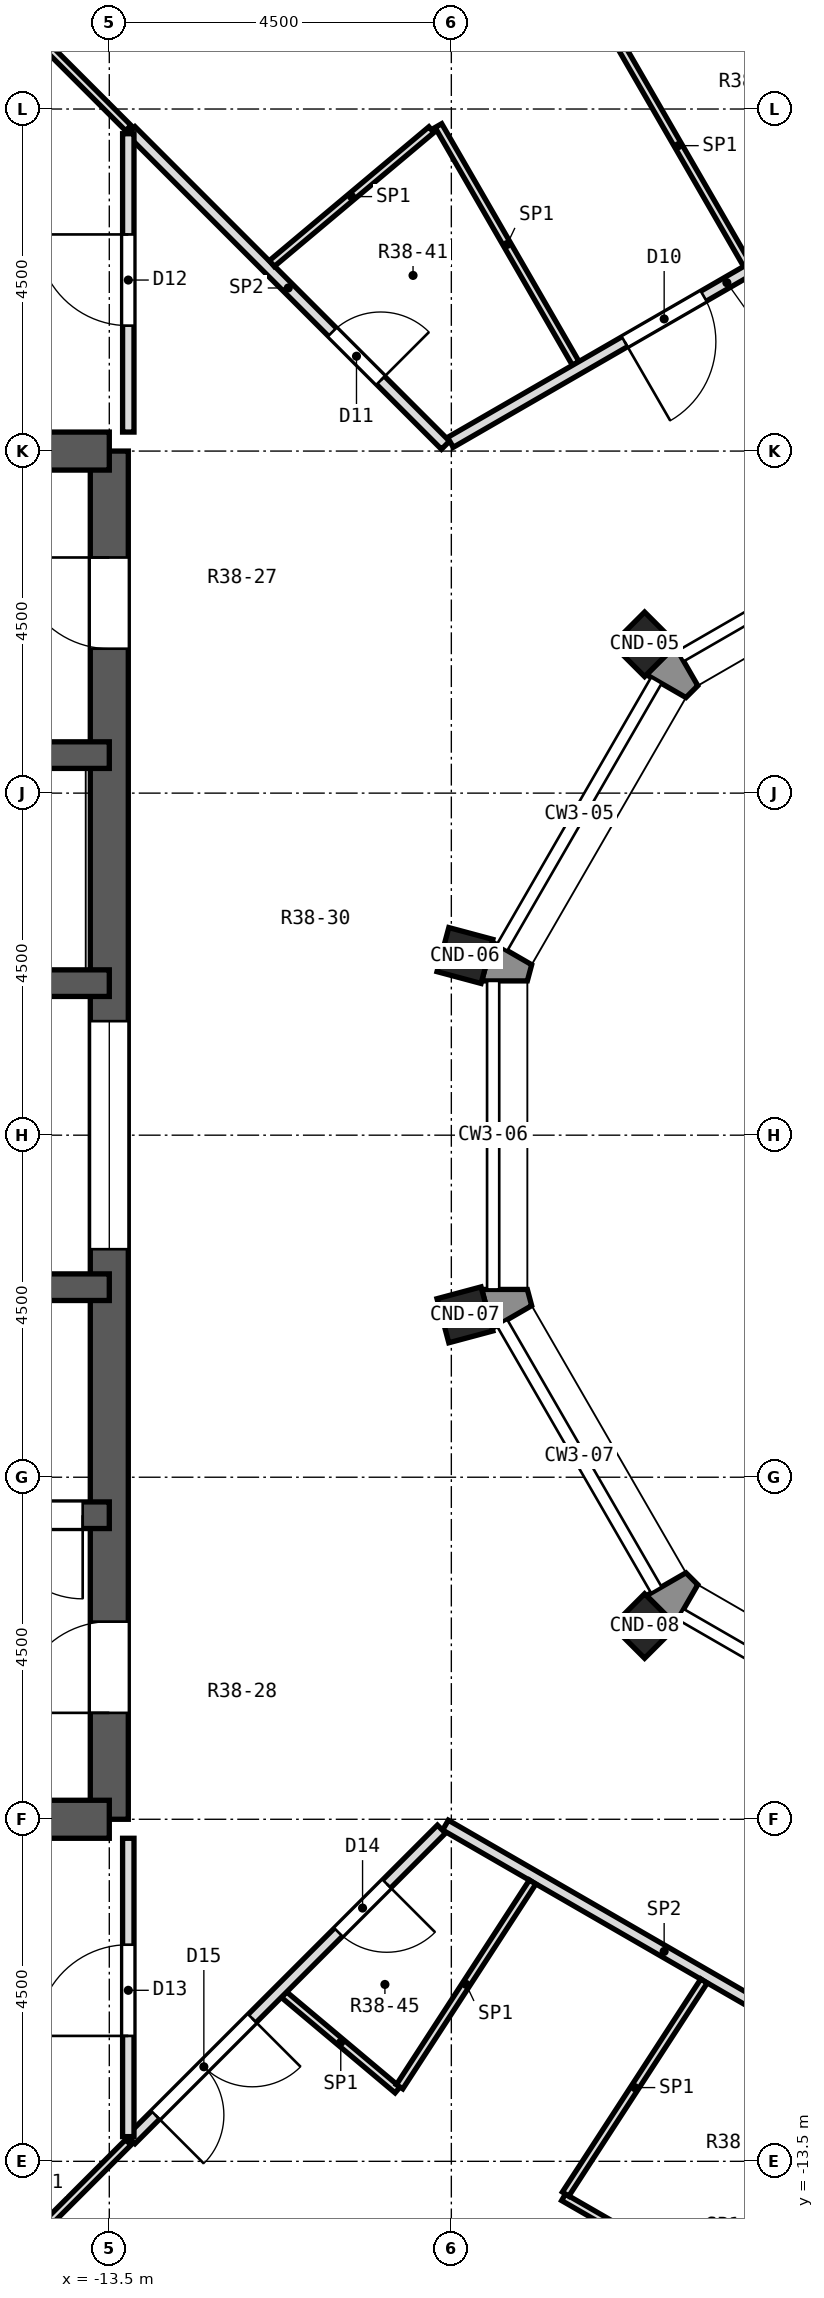
"""IFC4 building model, lengths in metres.
Left out: names, types, materials, properties, quantities, classifications, styles, units other than length and angle.
Written with IfcOpenShell. Run it as: python <this file> out.ifc"""

import sys

from ifc_helpers import new_model, si_unit, direction, frame, frame_2d, origin, origin_2d, place, context, subcontext, project, spatial, polyline, rectangle, outline, extrude, element, fill, save


model = new_model("IFC4")
c1 = context("Model", 3, precision=1e-05, world=origin(), true_north=direction((0.0, 1.0)))
c2 = subcontext(c1, "Body", "Model", "MODEL_VIEW")
j1 = project(units=[si_unit("LENGTHUNIT", "METRE"), si_unit("PLANEANGLEUNIT", "RADIAN")], contexts=[c1])
p1 = place(None, origin())
s1 = spatial("IfcSite", under=j1, at=p1, CompositionType="ELEMENT")
p2 = place(p1, origin())
s2 = spatial("IfcBuilding", under=s1, at=p2, CompositionType="ELEMENT")
p3 = place(p2, frame((0.0, 0.0, 279.2)))
s3 = spatial("IfcBuildingStorey", under=s2, at=p3, CompositionType="ELEMENT", Elevation=279.2)
for number, where, z_axis, x_axis in (
    (1, (-6.458, 6.458, 0.0), (0.0, 0.0, 1.0), (-0.707, 0.707, 0.0)),
    (2, (-8.821, 2.364, 0.0), (0.0, 0.0, 1.0), (-0.966, 0.259, 0.0)),
    (3, (-8.821, -2.364, 0.0), (0.0, 0.0, 1.0), (-0.966, -0.259, 0.0)),
    (4, (-6.458, -6.458, 0.0), (0.0, 0.0, 1.0), (-0.707, -0.707, 0.0)),
):
    element("IfcColumn", number, at=place(p3, frame(where, z_axis=z_axis, x_axis=x_axis)), inside=s3, PredefinedType="COLUMN", context=c2, shape_type="SweptSolid", body=[
        extrude(rectangle(XDim=0.6, YDim=0.6, at=origin_2d()), origin(), (0.0, 0.0, 1.0), 5.0),
    ])
p4 = place(p3, frame((-13.5, -9.0, 0.0), z_axis=(0.0, 0.0, 1.0), x_axis=(0.0, 1.0, 0.0)))
e5 = element("IfcWall", 5, at=p4, inside=s3, PredefinedType="SHEAR", context=c2, shape_type="SweptSolid", body=[
    extrude(rectangle(XDim=18.0, YDim=0.5, at=frame_2d((9.0, 0.0))), origin(), (0.0, 0.0, 1.0), 5.0),
])
p5 = place(p4, frame((15.4, 0.0, 0.0)))
e6 = element("IfcOpeningElement", 6, at=p5, cuts=e5, PredefinedType="OPENING", context=c2, shape_type="SweptSolid", body=[
    extrude(rectangle(XDim=1.2, YDim=2.1, at=frame_2d((0.6, 1.05))), frame((0.0, 0.262, 0.0), z_axis=(0.0, -1.0, 0.0), x_axis=(1.0, 0.0, 0.0)), (0.0, 0.0, 1.0), 0.524),
])
p6 = place(p4, frame((1.4, 0.0, 0.0)))
e7 = element("IfcOpeningElement", 7, at=p6, cuts=e5, PredefinedType="OPENING", context=c2, shape_type="SweptSolid", body=[
    extrude(rectangle(XDim=1.2, YDim=2.1, at=frame_2d((0.6, 1.05))), frame((0.0, 0.262, 0.0), z_axis=(0.0, -1.0, 0.0), x_axis=(1.0, 0.0, 0.0)), (0.0, 0.0, 1.0), 0.524),
])
p7 = place(p4, frame((7.5, 0.0, 0.0)))
e8 = element("IfcOpeningElement", 8, at=p7, cuts=e5, PredefinedType="OPENING", context=c2, shape_type="SweptSolid", body=[
    extrude(rectangle(XDim=3.0, YDim=2.4, at=frame_2d((1.5, 1.2))), frame((0.0, 0.262, 0.0), z_axis=(0.0, -1.0, 0.0), x_axis=(1.0, 0.0, 0.0)), (0.0, 0.0, 1.0), 0.524),
])
for number, where, z_axis, x_axis in (
    (9, (-13.5, 9.0, 0.0), (0.0, 0.0, 1.0), (-1.0, 0.0, 0.0)),
    (10, (-13.5, -9.0, 0.0), (0.0, 0.0, 1.0), (-1.0, 0.0, 0.0)),
):
    element("IfcWall", number, at=place(p3, frame(where, z_axis=z_axis, x_axis=x_axis)), inside=s3, PredefinedType="SHEAR", context=c2, shape_type="SweptSolid", body=[
        extrude(rectangle(XDim=6.0, YDim=0.5, at=frame_2d((3.0, 0.0))), origin(), (0.0, 0.0, 1.0), 5.0),
    ])
p8 = place(p3, frame((-13.5, 5.0, 0.0), z_axis=(0.0, 0.0, 1.0), x_axis=(-1.0, 0.0, 0.0)))
e11 = element("IfcWall", 11, at=p8, inside=s3, PredefinedType="SHEAR", context=c2, shape_type="SweptSolid", body=[
    extrude(rectangle(XDim=6.0, YDim=0.35, at=frame_2d((3.0, 0.0))), origin(), (0.0, 0.0, 1.0), 5.0),
])
p9 = place(p3, frame((-13.5, -5.0, 0.0), z_axis=(0.0, 0.0, 1.0), x_axis=(-1.0, 0.0, 0.0)))
e12 = element("IfcWall", 12, at=p9, inside=s3, PredefinedType="SHEAR", context=c2, shape_type="SweptSolid", body=[
    extrude(rectangle(XDim=6.0, YDim=0.35, at=frame_2d((3.0, 0.0))), origin(), (0.0, 0.0, 1.0), 5.0),
])
p10 = place(p9, frame((0.35, 0.0, 0.0)))
e13 = element("IfcOpeningElement", 13, at=p10, cuts=e12, PredefinedType="OPENING", context=c2, shape_type="SweptSolid", body=[
    extrude(rectangle(XDim=1.1, YDim=2.1, at=frame_2d((0.55, 1.05))), frame((0.0, 0.187, 0.0), z_axis=(0.0, -1.0, 0.0), x_axis=(1.0, 0.0, 0.0)), (0.0, 0.0, 1.0), 0.374),
])
p11 = place(p3, frame((-13.5, 2.0, 0.0), z_axis=(0.0, 0.0, 1.0), x_axis=(-1.0, 0.0, 0.0)))
e14 = element("IfcWall", 14, at=p11, inside=s3, PredefinedType="SHEAR", context=c2, shape_type="SweptSolid", body=[
    extrude(rectangle(XDim=6.0, YDim=0.35, at=frame_2d((3.0, 0.0))), origin(), (0.0, 0.0, 1.0), 5.0),
])
p12 = place(p11, frame((1.37, 0.0, 0.0)))
e15 = element("IfcOpeningElement", 15, at=p12, cuts=e14, PredefinedType="OPENING", context=c2, shape_type="SweptSolid", body=[
    extrude(rectangle(XDim=1.1, YDim=2.1, at=frame_2d((0.55, 1.05))), frame((0.0, 0.187, 0.0), z_axis=(0.0, -1.0, 0.0), x_axis=(1.0, 0.0, 0.0)), (0.0, 0.0, 1.0), 0.374),
])
p13 = place(p11, frame((3.09, 0.0, 0.0)))
e16 = element("IfcOpeningElement", 16, at=p13, cuts=e14, PredefinedType="OPENING", context=c2, shape_type="SweptSolid", body=[
    extrude(rectangle(XDim=1.1, YDim=2.1, at=frame_2d((0.55, 1.05))), frame((0.0, 0.187, 0.0), z_axis=(0.0, -1.0, 0.0), x_axis=(1.0, 0.0, 0.0)), (0.0, 0.0, 1.0), 0.374),
])
p14 = place(p11, frame((5.105, 0.0, 0.0)))
e17 = element("IfcOpeningElement", 17, at=p14, cuts=e14, PredefinedType="OPENING", context=c2, shape_type="SweptSolid", body=[
    extrude(rectangle(XDim=0.6, YDim=2.1, at=frame_2d((0.3, 1.05))), frame((0.0, 0.187, 0.0), z_axis=(0.0, -1.0, 0.0), x_axis=(1.0, 0.0, 0.0)), (0.0, 0.0, 1.0), 0.374),
])
p15 = place(p3, frame((-13.5, -2.0, 0.0), z_axis=(0.0, 0.0, 1.0), x_axis=(-1.0, 0.0, 0.0)))
e18 = element("IfcWall", 18, at=p15, inside=s3, PredefinedType="SHEAR", context=c2, shape_type="SweptSolid", body=[
    extrude(rectangle(XDim=6.0, YDim=0.35, at=frame_2d((3.0, 0.0))), origin(), (0.0, 0.0, 1.0), 5.0),
])
p16 = place(p15, frame((1.14, 0.0, 0.0)))
e19 = element("IfcOpeningElement", 19, at=p16, cuts=e18, PredefinedType="OPENING", context=c2, shape_type="SweptSolid", body=[
    extrude(rectangle(XDim=1.0, YDim=2.1, at=frame_2d((0.5, 1.05))), frame((0.0, 0.187, 0.0), z_axis=(0.0, -1.0, 0.0), x_axis=(1.0, 0.0, 0.0)), (0.0, 0.0, 1.0), 0.374),
])
p17 = place(p3, origin())
e20 = element("IfcWall", 20, at=p17, inside=s3, PredefinedType="SOLIDWALL", context=c2, shape_type="SweptSolid", body=[
    extrude(outline(polyline([(-6.433, 6.058), (-5.914, 5.758), (-5.758, 5.914), (-6.058, 6.433), (-6.433, 6.058)])), origin(), (0.0, 0.0, 1.0), 4.45),
])
p18 = place(p3, origin())
e21 = element("IfcWall", 21, at=p18, inside=s3, PredefinedType="SOLIDWALL", context=c2, shape_type="SweptSolid", body=[
    extrude(outline(polyline([(-8.6, 2.029), (-8.0, 2.029), (-7.943, 2.242), (-8.462, 2.542), (-8.6, 2.029)])), origin(), (0.0, 0.0, 1.0), 4.45),
])
p19 = place(p3, origin())
e22 = element("IfcWall", 22, at=p19, inside=s3, PredefinedType="SOLIDWALL", context=c2, shape_type="SweptSolid", body=[
    extrude(outline(polyline([(-8.462, -2.542), (-7.943, -2.242), (-8.0, -2.029), (-8.6, -2.029), (-8.462, -2.542)])), origin(), (0.0, 0.0, 1.0), 4.45),
])
p20 = place(p3, origin())
e23 = element("IfcWall", 23, at=p20, inside=s3, PredefinedType="SOLIDWALL", context=c2, shape_type="SweptSolid", body=[
    extrude(outline(polyline([(-6.058, -6.433), (-5.758, -5.914), (-5.914, -5.758), (-6.433, -6.058), (-6.058, -6.433)])), origin(), (0.0, 0.0, 1.0), 4.45),
])
p21 = place(p3, frame((-5.646, 21.072, 0.0), z_axis=(0.0, 0.0, 1.0), x_axis=(0.258728835498, -0.965949993365, 0.0)))
e24 = element("IfcWall", 24, at=p21, inside=s3, PredefinedType="PARTITIONING", context=c2, shape_type="SweptSolid", body=[
    extrude(rectangle(XDim=8.978, YDim=0.1, at=frame_2d((4.489, 0.0))), origin(), (0.0, 0.0, 1.0), 4.45),
])
p22 = place(p3, frame((-9.17, 13.282, 0.0), z_axis=(0.0, 0.0, 1.0), x_axis=(0.49998372882, -0.866034797751, 0.0)))
e25 = element("IfcWall", 25, at=p22, inside=s3, PredefinedType="PARTITIONING", context=c2, shape_type="SweptSolid", body=[
    extrude(rectangle(XDim=3.613, YDim=0.1, at=frame_2d((1.806, 0.0))), origin(), (0.0, 0.0, 1.0), 4.45),
])
p23 = place(p3, frame((-6.918, 14.582, 0.0), z_axis=(0.0, 0.0, 1.0), x_axis=(0.500071521611, -0.865984106825, 0.0)))
e26 = element("IfcWall", 26, at=p23, inside=s3, PredefinedType="PARTITIONING", context=c2, shape_type="SweptSolid", body=[
    extrude(rectangle(XDim=3.612, YDim=0.1, at=frame_2d((1.806, 0.0))), origin(), (0.0, 0.0, 1.0), 4.45),
])
p24 = place(p3, frame((-15.426, 15.426, 0.0), z_axis=(0.0, 0.0, 1.0), x_axis=(0.707106781187, -0.707106781187, 0.0)))
e27 = element("IfcWall", 27, at=p24, inside=s3, PredefinedType="PARTITIONING", context=c2, shape_type="SweptSolid", body=[
    extrude(rectangle(XDim=3.077, YDim=0.1, at=frame_2d((1.538, 0.0))), origin(), (0.0, 0.0, 1.0), 4.45),
])
p25 = place(p3, frame((-13.215, 13.215, 0.0), z_axis=(0.0, 0.0, 1.0), x_axis=(0.707106781187, -0.707106781187, 0.0)))
e28 = element("IfcWall", 28, at=p25, inside=s3, PredefinedType="PARTITIONING", context=c2, shape_type="SweptSolid", body=[
    extrude(rectangle(XDim=5.852, YDim=0.15, at=frame_2d((2.926, 0.0))), origin(), (0.0, 0.0, 1.0), 4.45),
])
p26 = place(p25, frame((3.746, 0.0, 0.0)))
e29 = element("IfcOpeningElement", 29, at=p26, cuts=e28, PredefinedType="OPENING", context=c2, shape_type="SweptSolid", body=[
    extrude(rectangle(XDim=0.9, YDim=2.1, at=frame_2d((0.45, 1.05))), frame((0.0, 0.087, 0.0), z_axis=(0.0, -1.0, 0.0), x_axis=(1.0, 0.0, 0.0)), (0.0, 0.0, 1.0), 0.174),
])
p27 = place(p3, frame((-11.202, -11.307, 0.0), z_axis=(0.0, 0.0, 1.0), x_axis=(0.765897191843, -0.642963056114, 0.0)))
e30 = element("IfcWall", 30, at=p27, inside=s3, PredefinedType="PARTITIONING", context=c2, shape_type="SweptSolid", body=[
    extrude(rectangle(XDim=1.95, YDim=0.1, at=frame_2d((0.975, 0.0))), origin(), (0.0, 0.0, 1.0), 4.45),
])
p28 = place(p3, frame((-9.077, -9.077, 0.0), z_axis=(0.0, 0.0, 1.0), x_axis=(0.865961614908, -0.500110469302, 0.0)))
e31 = element("IfcWall", 31, at=p28, inside=s3, PredefinedType="PARTITIONING", context=c2, shape_type="SweptSolid", body=[
    extrude(rectangle(XDim=6.645, YDim=0.15, at=frame_2d((3.322, 0.0))), origin(), (0.0, 0.0, 1.0), 4.45),
])
p29 = place(p28, frame((4.86, 0.0, 0.0)))
e32 = element("IfcOpeningElement", 32, at=p29, cuts=e31, PredefinedType="OPENING", context=c2, shape_type="SweptSolid", body=[
    extrude(rectangle(XDim=0.9, YDim=2.1, at=frame_2d((0.45, 1.05))), frame((0.0, 0.087, 0.0), z_axis=(0.0, -1.0, 0.0), x_axis=(1.0, 0.0, 0.0)), (0.0, 0.0, 1.0), 0.174),
])
p30 = place(p3, frame((-7.524, -13.973, 0.0), z_axis=(0.0, 0.0, 1.0), x_axis=(0.866468987099, -0.499230902886, 0.0)))
e33 = element("IfcWall", 33, at=p30, inside=s3, PredefinedType="PARTITIONING", context=c2, shape_type="SweptSolid", body=[
    extrude(rectangle(XDim=0.917, YDim=0.1, at=frame_2d((0.459, 0.0))), origin(), (0.0, 0.0, 1.0), 4.45),
])
p31 = place(p3, frame((-9.012, 9.115, 0.0), z_axis=(0.0, 0.0, 1.0), x_axis=(0.865967095912, 0.5001009786, 0.0)))
e34 = element("IfcWall", 34, at=p31, inside=s3, PredefinedType="PARTITIONING", context=c2, shape_type="SweptSolid", body=[
    extrude(rectangle(XDim=6.495, YDim=0.15, at=frame_2d((3.248, 0.0))), origin(), (0.0, 0.0, 1.0), 4.45),
])
p32 = place(p31, frame((5.109, 0.0, 0.0)))
e35 = element("IfcOpeningElement", 35, at=p32, cuts=e34, PredefinedType="OPENING", context=c2, shape_type="SweptSolid", body=[
    extrude(rectangle(XDim=0.9, YDim=2.1, at=frame_2d((0.45, 1.05))), frame((0.0, 0.087, 0.0), z_axis=(0.0, -1.0, 0.0), x_axis=(1.0, 0.0, 0.0)), (0.0, 0.0, 1.0), 0.174),
])
p33 = place(p31, frame((2.647, 0.0, 0.0)))
e36 = element("IfcOpeningElement", 36, at=p33, cuts=e34, PredefinedType="OPENING", context=c2, shape_type="SweptSolid", body=[
    extrude(rectangle(XDim=1.2, YDim=2.1, at=frame_2d((0.6, 1.05))), frame((0.0, 0.087, 0.0), z_axis=(0.0, -1.0, 0.0), x_axis=(1.0, 0.0, 0.0)), (0.0, 0.0, 1.0), 0.174),
])
p34 = place(p3, frame((-11.362, 11.467, 0.0), z_axis=(0.0, 0.0, 1.0), x_axis=(0.766083955689, 0.6427405175, 0.0)))
e37 = element("IfcWall", 37, at=p34, inside=s3, PredefinedType="PARTITIONING", context=c2, shape_type="SweptSolid", body=[
    extrude(rectangle(XDim=2.74, YDim=0.1, at=frame_2d((1.37, 0.0))), origin(), (0.0, 0.0, 1.0), 4.45),
])
p35 = place(p3, frame((-15.426, -15.426, 0.0), z_axis=(0.0, 0.0, 1.0), x_axis=(0.707106781187, 0.707106781187, 0.0)))
e38 = element("IfcWall", 38, at=p35, inside=s3, PredefinedType="PARTITIONING", context=c2, shape_type="SweptSolid", body=[
    extrude(rectangle(XDim=3.077, YDim=0.1, at=frame_2d((1.538, 0.0))), origin(), (0.0, 0.0, 1.0), 4.45),
])
p36 = place(p3, frame((-13.215, -13.215, 0.0), z_axis=(0.0, 0.0, 1.0), x_axis=(0.707106781187, 0.707106781187, 0.0)))
e39 = element("IfcWall", 39, at=p36, inside=s3, PredefinedType="PARTITIONING", context=c2, shape_type="SweptSolid", body=[
    extrude(rectangle(XDim=5.777, YDim=0.15, at=frame_2d((2.888, 0.0))), origin(), (0.0, 0.0, 1.0), 4.45),
])
p37 = place(p36, frame((3.859, 0.0, 0.0)))
e40 = element("IfcOpeningElement", 40, at=p37, cuts=e39, PredefinedType="OPENING", context=c2, shape_type="SweptSolid", body=[
    extrude(rectangle(XDim=0.9, YDim=2.1, at=frame_2d((0.45, 1.05))), frame((0.0, 0.087, 0.0), z_axis=(0.0, -1.0, 0.0), x_axis=(1.0, 0.0, 0.0)), (0.0, 0.0, 1.0), 0.174),
])
p38 = place(p36, frame((0.456, 0.0, 0.0)))
e41 = element("IfcOpeningElement", 41, at=p38, cuts=e39, PredefinedType="OPENING", context=c2, shape_type="SweptSolid", body=[
    extrude(rectangle(XDim=1.8, YDim=2.1, at=frame_2d((0.9, 1.05))), frame((0.0, 0.087, 0.0), z_axis=(0.0, -1.0, 0.0), x_axis=(1.0, 0.0, 0.0)), (0.0, 0.0, 1.0), 0.174),
])
p39 = place(p3, frame((-7.497, -13.931, 0.0), z_axis=(0.0, 0.0, 1.0), x_axis=(0.54476755827, 0.838587089966, 0.0)))
e42 = element("IfcWall", 42, at=p39, inside=s3, PredefinedType="PARTITIONING", context=c2, shape_type="SweptSolid", body=[
    extrude(rectangle(XDim=3.343, YDim=0.1, at=frame_2d((1.671, 0.0))), origin(), (0.0, 0.0, 1.0), 4.45),
])
p40 = place(p3, frame((-9.681, -12.519, 0.0), z_axis=(0.0, 0.0, 1.0), x_axis=(0.544873455053, 0.838518287206, 0.0)))
e43 = element("IfcWall", 43, at=p40, inside=s3, PredefinedType="PARTITIONING", context=c2, shape_type="SweptSolid", body=[
    extrude(rectangle(XDim=3.212, YDim=0.1, at=frame_2d((1.606, 0.0))), origin(), (0.0, 0.0, 1.0), 4.45),
])
p41 = place(p3, frame((-5.645, -21.072, 0.0), z_axis=(0.0, 0.0, 1.0), x_axis=(0.258659321195, 0.965968610028, 0.0)))
e44 = element("IfcWall", 44, at=p41, inside=s3, PredefinedType="PARTITIONING", context=c2, shape_type="SweptSolid", body=[
    extrude(rectangle(XDim=8.903, YDim=0.1, at=frame_2d((4.451, 0.0))), origin(), (0.0, 0.0, 1.0), 4.45),
])
p42 = place(p3, frame((-13.25, -13.175, 0.0), z_axis=(0.0, 0.0, 1.0), x_axis=(0.0, 1.0, 0.0)))
e45 = element("IfcWall", 45, at=p42, inside=s3, PredefinedType="PARTITIONING", context=c2, shape_type="SweptSolid", body=[
    extrude(rectangle(XDim=3.925, YDim=0.15, at=frame_2d((1.962, 0.0))), origin(), (0.0, 0.0, 1.0), 4.45),
])
p43 = place(p42, frame((1.325, 0.0, 0.0)))
e46 = element("IfcOpeningElement", 46, at=p43, cuts=e45, PredefinedType="OPENING", context=c2, shape_type="SweptSolid", body=[
    extrude(rectangle(XDim=1.2, YDim=2.1, at=frame_2d((0.6, 1.05))), frame((0.0, 0.087, 0.0), z_axis=(0.0, -1.0, 0.0), x_axis=(1.0, 0.0, 0.0)), (0.0, 0.0, 1.0), 0.174),
])
p44 = place(p3, frame((-13.25, 9.25, 0.0), z_axis=(0.0, 0.0, 1.0), x_axis=(0.0, 1.0, 0.0)))
e47 = element("IfcWall", 47, at=p44, inside=s3, PredefinedType="PARTITIONING", context=c2, shape_type="SweptSolid", body=[
    extrude(rectangle(XDim=3.925, YDim=0.15, at=frame_2d((1.962, 0.0))), origin(), (0.0, 0.0, 1.0), 4.45),
])
p45 = place(p44, frame((1.4, 0.0, 0.0)))
e48 = element("IfcOpeningElement", 48, at=p45, cuts=e47, PredefinedType="OPENING", context=c2, shape_type="SweptSolid", body=[
    extrude(rectangle(XDim=1.2, YDim=2.1, at=frame_2d((0.6, 1.05))), frame((0.0, 0.087, 0.0), z_axis=(0.0, -1.0, 0.0), x_axis=(1.0, 0.0, 0.0)), (0.0, 0.0, 1.0), 0.174),
])
p46 = place(p33, frame((1.2, 0.0, 0.0), z_axis=(0.0, 0.0, 1.0), x_axis=(-1.0, 0.0, 0.0)))
e49 = element("IfcDoor", 49, at=p46, inside=s3, OperationType="SINGLE_SWING_RIGHT", PredefinedType="DOOR", context=c2, shape_type="SweptSolid", body=[
    extrude(rectangle(XDim=1.2, YDim=2.1, at=frame_2d((0.6, 1.05))), frame((0.0, 0.025, 0.0), z_axis=(0.0, -1.0, 0.0), x_axis=(1.0, 0.0, 0.0)), (0.0, 0.0, 1.0), 0.05),
])
fill(e36, e49)
p47 = place(p26, origin())
e50 = element("IfcDoor", 50, at=p47, inside=s3, OperationType="SINGLE_SWING_RIGHT", PredefinedType="DOOR", context=c2, shape_type="SweptSolid", body=[
    extrude(rectangle(XDim=0.9, YDim=2.1, at=frame_2d((0.45, 1.05))), frame((0.0, 0.025, 0.0), z_axis=(0.0, -1.0, 0.0), x_axis=(1.0, 0.0, 0.0)), (0.0, 0.0, 1.0), 0.05),
])
fill(e29, e50)
p48 = place(p45, origin())
e51 = element("IfcDoor", 51, at=p48, inside=s3, OperationType="SINGLE_SWING_RIGHT", PredefinedType="DOOR", context=c2, shape_type="SweptSolid", body=[
    extrude(rectangle(XDim=1.2, YDim=2.1, at=frame_2d((0.6, 1.05))), frame((0.0, 0.025, 0.0), z_axis=(0.0, -1.0, 0.0), x_axis=(1.0, 0.0, 0.0)), (0.0, 0.0, 1.0), 0.05),
])
fill(e48, e51)
p49 = place(p43, origin())
e52 = element("IfcDoor", 52, at=p49, inside=s3, OperationType="SINGLE_SWING_LEFT", PredefinedType="DOOR", context=c2, shape_type="SweptSolid", body=[
    extrude(rectangle(XDim=1.2, YDim=2.1, at=frame_2d((0.6, 1.05))), frame((0.0, 0.025, 0.0), z_axis=(0.0, -1.0, 0.0), x_axis=(1.0, 0.0, 0.0)), (0.0, 0.0, 1.0), 0.05),
])
fill(e46, e52)
p50 = place(p37, frame((0.9, 0.0, 0.0), z_axis=(0.0, 0.0, 1.0), x_axis=(-1.0, 0.0, 0.0)))
e53 = element("IfcDoor", 53, at=p50, inside=s3, OperationType="SINGLE_SWING_LEFT", PredefinedType="DOOR", context=c2, shape_type="SweptSolid", body=[
    extrude(rectangle(XDim=0.9, YDim=2.1, at=frame_2d((0.45, 1.05))), frame((0.0, 0.025, 0.0), z_axis=(0.0, -1.0, 0.0), x_axis=(1.0, 0.0, 0.0)), (0.0, 0.0, 1.0), 0.05),
])
fill(e40, e53)
p51 = place(p38, frame((1.8, 0.0, 0.0), z_axis=(0.0, 0.0, 1.0), x_axis=(-1.0, 0.0, 0.0)))
e54 = element("IfcDoor", 54, at=p51, inside=s3, OperationType="DOUBLE_DOOR_SINGLE_SWING", PredefinedType="DOOR", context=c2, shape_type="SweptSolid", body=[
    extrude(rectangle(XDim=1.8, YDim=2.1, at=frame_2d((0.9, 1.05))), frame((0.0, 0.025, 0.0), z_axis=(0.0, -1.0, 0.0), x_axis=(1.0, 0.0, 0.0)), (0.0, 0.0, 1.0), 0.05),
])
fill(e41, e54)
p52 = place(p10, origin())
e55 = element("IfcDoor", 55, at=p52, inside=s3, OperationType="SINGLE_SWING_LEFT", PredefinedType="DOOR", context=c2, shape_type="SweptSolid", body=[
    extrude(rectangle(XDim=1.1, YDim=2.1, at=frame_2d((0.55, 1.05))), frame((0.0, 0.025, 0.0), z_axis=(0.0, -1.0, 0.0), x_axis=(1.0, 0.0, 0.0)), (0.0, 0.0, 1.0), 0.05),
])
fill(e13, e55)
p53 = place(p5, origin())
e56 = element("IfcDoor", 56, at=p53, inside=s3, OperationType="SINGLE_SWING_RIGHT", PredefinedType="DOOR", context=c2, shape_type="SweptSolid", body=[
    extrude(rectangle(XDim=1.2, YDim=2.1, at=frame_2d((0.6, 1.05))), frame((0.0, 0.025, 0.0), z_axis=(0.0, -1.0, 0.0), x_axis=(1.0, 0.0, 0.0)), (0.0, 0.0, 1.0), 0.05),
])
fill(e6, e56)
p54 = place(p6, origin())
e57 = element("IfcDoor", 57, at=p54, inside=s3, OperationType="SINGLE_SWING_LEFT", PredefinedType="DOOR", context=c2, shape_type="SweptSolid", body=[
    extrude(rectangle(XDim=1.2, YDim=2.1, at=frame_2d((0.6, 1.05))), frame((0.0, 0.025, 0.0), z_axis=(0.0, -1.0, 0.0), x_axis=(1.0, 0.0, 0.0)), (0.0, 0.0, 1.0), 0.05),
])
fill(e7, e57)
p55 = place(p7, origin())
e58 = element("IfcDoor", 58, at=p55, inside=s3, OperationType="DOUBLE_DOOR_SLIDING", PredefinedType="DOOR", context=c2, shape_type="SweptSolid", body=[
    extrude(rectangle(XDim=3.0, YDim=2.4, at=frame_2d((1.5, 1.2))), frame((0.0, 0.025, 0.0), z_axis=(0.0, -1.0, 0.0), x_axis=(1.0, 0.0, 0.0)), (0.0, 0.0, 1.0), 0.05),
])
fill(e8, e58)
save(model, sys.argv[1])
